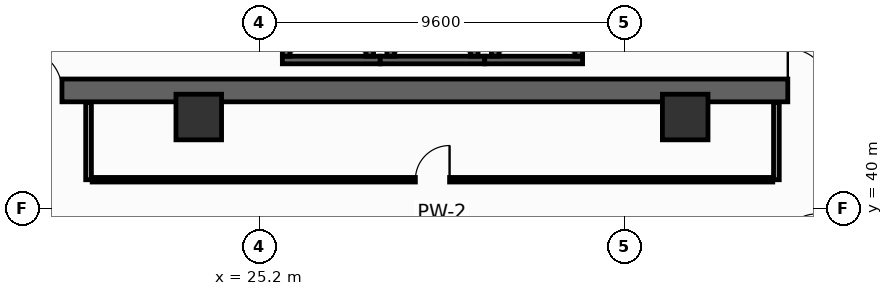
"""IFC4 building model, lengths in metres.
Left out: names, types, materials, properties, quantities, classifications, styles, units other than length and angle.
Written with IfcOpenShell. Run it as: python <this file> out.ifc"""

import sys

from ifc_helpers import new_model, si_unit, direction, frame, frame_2d, origin, origin_2d, place, context, subcontext, project, spatial, rectangle, hollow_rectangle, extrude, element, fill, save


model = new_model("IFC4")
c1 = context("Model", 3, precision=1e-05, world=origin(), true_north=direction((0.0, 1.0)))
c2 = subcontext(c1, "Body", "Model", "MODEL_VIEW")
j1 = project(units=[si_unit("LENGTHUNIT", "METRE"), si_unit("PLANEANGLEUNIT", "RADIAN")], contexts=[c1])
p1 = place(None, origin())
s1 = spatial("IfcSite", under=j1, at=p1, CompositionType="ELEMENT")
p2 = place(p1, origin())
s2 = spatial("IfcBuilding", under=s1, at=p2, CompositionType="ELEMENT")
p3 = place(p2, frame((0.0, 0.0, 38.4)))
s3 = spatial("IfcBuildingStorey", under=s2, at=p3, CompositionType="ELEMENT", Elevation=38.4)
p4 = place(p3, frame((13.5, 43.1, 0.0), z_axis=(0.0, 0.0, 1.0), x_axis=(1.0, 0.0, 0.0)))
e1 = element("IfcWall", 1, at=p4, inside=s3, PredefinedType="SHEAR", context=c2, shape_type="SweptSolid", body=[
    extrude(rectangle(XDim=32.9, YDim=0.6, at=frame_2d((16.45, 0.0))), origin(), (0.0, 0.0, 1.0), 4.15),
])
p5 = place(p4, frame((5.4, 0.0, 0.0)))
e2 = element("IfcOpeningElement", 2, at=p5, cuts=e1, PredefinedType="OPENING", context=c2, shape_type="SweptSolid", body=[
    extrude(rectangle(XDim=1.1, YDim=2.15, at=frame_2d((0.55, 1.075))), frame((0.0, 0.31, 0.0), z_axis=(0.0, -1.0, 0.0), x_axis=(1.0, 0.0, 0.0)), (0.0, 0.0, 1.0), 0.62),
])
p6 = place(p4, frame((25.6, 0.0, 0.0)))
e3 = element("IfcOpeningElement", 3, at=p6, cuts=e1, PredefinedType="OPENING", context=c2, shape_type="SweptSolid", body=[
    extrude(rectangle(XDim=1.1, YDim=2.15, at=frame_2d((0.55, 1.075))), frame((0.0, 0.31, 0.0), z_axis=(0.0, -1.0, 0.0), x_axis=(1.0, 0.0, 0.0)), (0.0, 0.0, 1.0), 0.62),
])
for number, where, z_axis, x_axis in (
    (4, (23.6, 42.4, 0.0), (0.0, 0.0, 1.0), (1.0, 0.0, 0.0)),
    (5, (36.4, 42.4, 0.0), (0.0, 0.0, 1.0), (1.0, 0.0, 0.0)),
):
    element("IfcColumn", number, at=place(p3, frame(where, z_axis=z_axis, x_axis=x_axis)), inside=s3, PredefinedType="COLUMN", context=c2, shape_type="SweptSolid", body=[
        extrude(hollow_rectangle(XDim=1.2, YDim=1.2, WallThickness=0.055, at=origin_2d()), origin(), (0.0, 0.0, 1.0), 4.4),
    ])
p7 = place(p3, frame((25.8, 43.9, 0.0), z_axis=(0.0, 0.0, 1.0), x_axis=(1.0, 0.0, 0.0)))
e6 = element("IfcWall", 6, at=p7, inside=s3, PredefinedType="SHEAR", context=c2, shape_type="SweptSolid", body=[
    extrude(rectangle(XDim=2.575, YDim=0.2, at=frame_2d((1.288, 0.0))), origin(), (0.0, 0.0, 1.0), 4.15),
])
for number, where, z_axis, x_axis in (
    (7, (25.9, 44.0, 0.0), (0.0, 0.0, 1.0), (0.0, 1.0, 0.0)),
    (8, (28.1, 44.0, 0.0), (0.0, 0.0, 1.0), (0.0, 1.0, 0.0)),
):
    element("IfcWall", number, at=place(p3, frame(where, z_axis=z_axis, x_axis=x_axis)), inside=s3, PredefinedType="SHEAR", context=c2, shape_type="SweptSolid", body=[
        extrude(rectangle(XDim=2.3, YDim=0.2, at=frame_2d((1.15, 0.0))), origin(), (0.0, 0.0, 1.0), 4.15),
    ])
p8 = place(p3, frame((28.375, 43.9, 0.0), z_axis=(0.0, 0.0, 1.0), x_axis=(1.0, 0.0, 0.0)))
e9 = element("IfcWall", 9, at=p8, inside=s3, PredefinedType="SHEAR", context=c2, shape_type="SweptSolid", body=[
    extrude(rectangle(XDim=2.75, YDim=0.2, at=frame_2d((1.375, 0.0))), origin(), (0.0, 0.0, 1.0), 4.15),
])
for number, where, z_axis, x_axis in (
    (10, (28.65, 44.0, 0.0), (0.0, 0.0, 1.0), (0.0, 1.0, 0.0)),
    (11, (30.85, 44.0, 0.0), (0.0, 0.0, 1.0), (0.0, 1.0, 0.0)),
):
    element("IfcWall", number, at=place(p3, frame(where, z_axis=z_axis, x_axis=x_axis)), inside=s3, PredefinedType="SHEAR", context=c2, shape_type="SweptSolid", body=[
        extrude(rectangle(XDim=2.3, YDim=0.2, at=frame_2d((1.15, 0.0))), origin(), (0.0, 0.0, 1.0), 4.15),
    ])
p9 = place(p3, frame((31.125, 43.9, 0.0), z_axis=(0.0, 0.0, 1.0), x_axis=(1.0, 0.0, 0.0)))
e12 = element("IfcWall", 12, at=p9, inside=s3, PredefinedType="SHEAR", context=c2, shape_type="SweptSolid", body=[
    extrude(rectangle(XDim=2.575, YDim=0.2, at=frame_2d((1.288, 0.0))), origin(), (0.0, 0.0, 1.0), 4.15),
])
for number, where, z_axis, x_axis in (
    (13, (31.4, 44.0, 0.0), (0.0, 0.0, 1.0), (0.0, 1.0, 0.0)),
    (14, (33.6, 44.0, 0.0), (0.0, 0.0, 1.0), (0.0, 1.0, 0.0)),
):
    element("IfcWall", number, at=place(p3, frame(where, z_axis=z_axis, x_axis=x_axis)), inside=s3, PredefinedType="SHEAR", context=c2, shape_type="SweptSolid", body=[
        extrude(rectangle(XDim=2.3, YDim=0.2, at=frame_2d((1.15, 0.0))), origin(), (0.0, 0.0, 1.0), 4.15),
    ])
for number, where, z_axis, x_axis in (
    (15, (20.7, 40.75, 0.0), (0.0, 0.0, 1.0), (0.0, 1.0, 0.0)),
    (16, (38.8, 40.75, 0.0), (0.0, 0.0, 1.0), (0.0, 1.0, 0.0)),
):
    element("IfcWall", number, at=place(p3, frame(where, z_axis=z_axis, x_axis=x_axis)), inside=s3, PredefinedType="PARTITIONING", context=c2, shape_type="SweptSolid", body=[
        extrude(rectangle(XDim=2.03, YDim=0.15, at=frame_2d((1.015, 0.0))), origin(), (0.0, 0.0, 1.0), 4.15),
    ])
p10 = place(p3, frame((20.795, 40.75, 0.0), z_axis=(0.0, 0.0, 1.0), x_axis=(1.0, 0.0, 0.0)))
e17 = element("IfcWall", 17, at=p10, inside=s3, PredefinedType="PARTITIONING", context=c2, shape_type="SweptSolid", body=[
    extrude(rectangle(XDim=17.91, YDim=0.12, at=frame_2d((8.955, 0.0))), origin(), (0.0, 0.0, 1.0), 3.335),
])
p11 = place(p10, frame((8.505, 0.0, 0.0)))
e18 = element("IfcOpeningElement", 18, at=p11, cuts=e17, PredefinedType="OPENING", context=c2, shape_type="SweptSolid", body=[
    extrude(rectangle(XDim=0.9, YDim=2.1, at=frame_2d((0.45, 1.05))), frame((0.0, 0.07, 0.0), z_axis=(0.0, -1.0, 0.0), x_axis=(1.0, 0.0, 0.0)), (0.0, 0.0, 1.0), 0.14),
])
p12 = place(p5, origin())
e19 = element("IfcDoor", 19, at=p12, inside=s3, OperationType="SINGLE_SWING_LEFT", PredefinedType="DOOR", context=c2, shape_type="SweptSolid", body=[
    extrude(rectangle(XDim=1.1, YDim=2.15, at=frame_2d((0.55, 1.075))), frame((0.0, 0.025, 0.0), z_axis=(0.0, -1.0, 0.0), x_axis=(1.0, 0.0, 0.0)), (0.0, 0.0, 1.0), 0.05),
])
fill(e2, e19)
p13 = place(p6, origin())
e20 = element("IfcDoor", 20, at=p13, inside=s3, OperationType="SINGLE_SWING_LEFT", PredefinedType="DOOR", context=c2, shape_type="SweptSolid", body=[
    extrude(rectangle(XDim=1.1, YDim=2.15, at=frame_2d((0.55, 1.075))), frame((0.0, 0.025, 0.0), z_axis=(0.0, -1.0, 0.0), x_axis=(1.0, 0.0, 0.0)), (0.0, 0.0, 1.0), 0.05),
])
fill(e3, e20)
p14 = place(p11, origin())
e21 = element("IfcDoor", 21, at=p14, inside=s3, OperationType="SINGLE_SWING_RIGHT", PredefinedType="DOOR", context=c2, shape_type="SweptSolid", body=[
    extrude(rectangle(XDim=0.9, YDim=2.1, at=frame_2d((0.45, 1.05))), frame((0.0, 0.025, 0.0), z_axis=(0.0, -1.0, 0.0), x_axis=(1.0, 0.0, 0.0)), (0.0, 0.0, 1.0), 0.05),
])
fill(e18, e21)
save(model, sys.argv[1])
